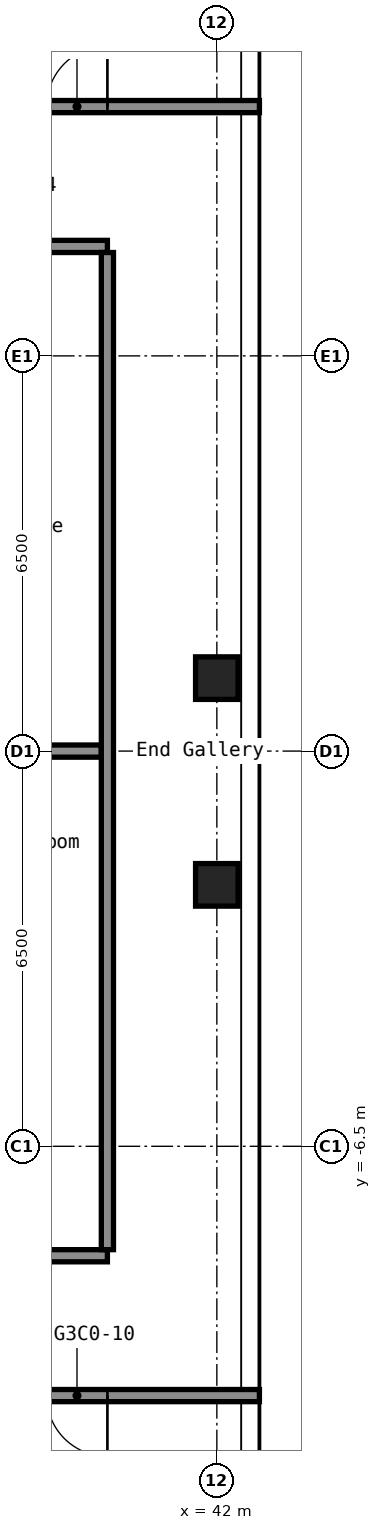
"""IFC4 building model, lengths in metres.
Left out: names, types, materials, properties, quantities, classifications, styles, units other than length and angle.
Written with IfcOpenShell. Run it as: python <this file> out.ifc"""

import sys

from ifc_helpers import new_model, si_unit, direction, frame, frame_2d, origin, origin_2d, place, context, subcontext, project, spatial, rectangle, hollow_rectangle, extrude, element, fill, save


model = new_model("IFC4")
c1 = context("Model", 3, precision=1e-05, world=origin(), true_north=direction((0.0, 1.0)))
c2 = subcontext(c1, "Body", "Model", "MODEL_VIEW")
j1 = project(units=[si_unit("LENGTHUNIT", "METRE"), si_unit("PLANEANGLEUNIT", "RADIAN")], contexts=[c1])
p1 = place(None, origin())
s1 = spatial("IfcSite", under=j1, at=p1, CompositionType="ELEMENT")
p2 = place(p1, origin())
s2 = spatial("IfcBuilding", under=s1, at=p2, CompositionType="ELEMENT")
p3 = place(p2, frame((0.0, 0.0, 137.4)))
s3 = spatial("IfcBuildingStorey", under=s2, at=p3, CompositionType="ELEMENT", Elevation=137.4)
for number, where, z_axis, x_axis in (
    (1, (42.0, -2.2, 0.0), (0.0, 0.0, 1.0), (1.0, 0.0, 0.0)),
    (2, (42.0, 1.2, 0.0), (0.0, 0.0, 1.0), (1.0, 0.0, 0.0)),
):
    element("IfcColumn", number, at=place(p3, frame(where, z_axis=z_axis, x_axis=x_axis)), inside=s3, PredefinedType="COLUMN", context=c2, shape_type="SweptSolid", body=[
        extrude(hollow_rectangle(XDim=0.7, YDim=0.7, WallThickness=0.028, at=origin_2d()), origin(), (0.0, 0.0, 1.0), 2.75),
    ])
p4 = place(p3, frame((16.8, -10.6, 0.0), z_axis=(0.0, 0.0, 1.0), x_axis=(1.0, 0.0, 0.0)))
e3 = element("IfcWall", 3, at=p4, inside=s3, PredefinedType="PARTITIONING", context=c2, shape_type="SweptSolid", body=[
    extrude(rectangle(XDim=25.9, YDim=0.2, at=frame_2d((12.95, 0.0))), origin(), (0.0, 0.0, 1.0), 2.75),
])
p5 = place(p4, frame((5.4, 0.0, 0.0)))
e4 = element("IfcOpeningElement", 4, at=p5, cuts=e3, PredefinedType="OPENING", context=c2, shape_type="SweptSolid", body=[
    extrude(rectangle(XDim=1.0, YDim=2.1, at=frame_2d((0.5, 1.05))), frame((0.0, 0.11, 0.0), z_axis=(0.0, -1.0, 0.0), x_axis=(1.0, 0.0, 0.0)), (0.0, 0.0, 1.0), 0.22),
])
p6 = place(p4, frame((11.25, 0.0, 0.0)))
e5 = element("IfcOpeningElement", 5, at=p6, cuts=e3, PredefinedType="OPENING", context=c2, shape_type="SweptSolid", body=[
    extrude(rectangle(XDim=1.0, YDim=2.1, at=frame_2d((0.5, 1.05))), frame((0.0, 0.11, 0.0), z_axis=(0.0, -1.0, 0.0), x_axis=(1.0, 0.0, 0.0)), (0.0, 0.0, 1.0), 0.22),
])
p7 = place(p4, frame((12.95, 0.0, 0.0)))
e6 = element("IfcOpeningElement", 6, at=p7, cuts=e3, PredefinedType="OPENING", context=c2, shape_type="SweptSolid", body=[
    extrude(rectangle(XDim=1.0, YDim=2.1, at=frame_2d((0.5, 1.05))), frame((0.0, 0.11, 0.0), z_axis=(0.0, -1.0, 0.0), x_axis=(1.0, 0.0, 0.0)), (0.0, 0.0, 1.0), 0.22),
])
p8 = place(p4, frame((22.4, 0.0, 0.0)))
e7 = element("IfcOpeningElement", 7, at=p8, cuts=e3, PredefinedType="OPENING", context=c2, shape_type="SweptSolid", body=[
    extrude(rectangle(XDim=1.0, YDim=2.1, at=frame_2d((0.5, 1.05))), frame((0.0, 0.11, 0.0), z_axis=(0.0, -1.0, 0.0), x_axis=(1.0, 0.0, 0.0)), (0.0, 0.0, 1.0), 0.22),
])
p9 = place(p3, frame((33.6, -8.3, 0.0), z_axis=(0.0, 0.0, 1.0), x_axis=(1.0, 0.0, 0.0)))
e8 = element("IfcWall", 8, at=p9, inside=s3, PredefinedType="PARTITIONING", context=c2, shape_type="SweptSolid", body=[
    extrude(rectangle(XDim=6.6, YDim=0.2, at=frame_2d((3.3, 0.0))), origin(), (0.0, 0.0, 1.0), 2.75),
])
p10 = place(p9, frame((0.805, 0.0, 0.0)))
e9 = element("IfcOpeningElement", 9, at=p10, cuts=e8, PredefinedType="OPENING", context=c2, shape_type="SweptSolid", body=[
    extrude(rectangle(XDim=0.9, YDim=2.1, at=frame_2d((0.45, 1.05))), frame((0.0, 0.11, 0.0), z_axis=(0.0, -1.0, 0.0), x_axis=(1.0, 0.0, 0.0)), (0.0, 0.0, 1.0), 0.22),
])
p11 = place(p9, frame((4.105, 0.0, 0.0)))
e10 = element("IfcOpeningElement", 10, at=p11, cuts=e8, PredefinedType="OPENING", context=c2, shape_type="SweptSolid", body=[
    extrude(rectangle(XDim=0.9, YDim=2.1, at=frame_2d((0.45, 1.05))), frame((0.0, 0.11, 0.0), z_axis=(0.0, -1.0, 0.0), x_axis=(1.0, 0.0, 0.0)), (0.0, 0.0, 1.0), 0.22),
])
p12 = place(p3, frame((33.6, 0.0, 0.0), z_axis=(0.0, 0.0, 1.0), x_axis=(1.0, 0.0, 0.0)))
e11 = element("IfcWall", 11, at=p12, inside=s3, PredefinedType="PARTITIONING", context=c2, shape_type="SweptSolid", body=[
    extrude(rectangle(XDim=6.5, YDim=0.2, at=frame_2d((3.25, 0.0))), origin(), (0.0, 0.0, 1.0), 2.75),
])
p13 = place(p3, frame((33.6, 8.3, 0.0), z_axis=(0.0, 0.0, 1.0), x_axis=(1.0, 0.0, 0.0)))
e12 = element("IfcWall", 12, at=p13, inside=s3, PredefinedType="PARTITIONING", context=c2, shape_type="SweptSolid", body=[
    extrude(rectangle(XDim=6.6, YDim=0.2, at=frame_2d((3.3, 0.0))), origin(), (0.0, 0.0, 1.0), 2.75),
])
p14 = place(p13, frame((1.07, 0.0, 0.0)))
e13 = element("IfcOpeningElement", 13, at=p14, cuts=e12, PredefinedType="OPENING", context=c2, shape_type="SweptSolid", body=[
    extrude(rectangle(XDim=0.9, YDim=2.1, at=frame_2d((0.45, 1.05))), frame((0.0, 0.11, 0.0), z_axis=(0.0, -1.0, 0.0), x_axis=(1.0, 0.0, 0.0)), (0.0, 0.0, 1.0), 0.22),
])
p15 = place(p13, frame((4.37, 0.0, 0.0)))
e14 = element("IfcOpeningElement", 14, at=p15, cuts=e12, PredefinedType="OPENING", context=c2, shape_type="SweptSolid", body=[
    extrude(rectangle(XDim=0.9, YDim=2.1, at=frame_2d((0.45, 1.05))), frame((0.0, 0.11, 0.0), z_axis=(0.0, -1.0, 0.0), x_axis=(1.0, 0.0, 0.0)), (0.0, 0.0, 1.0), 0.22),
])
p16 = place(p3, frame((16.8, 10.6, 0.0), z_axis=(0.0, 0.0, 1.0), x_axis=(1.0, 0.0, 0.0)))
e15 = element("IfcWall", 15, at=p16, inside=s3, PredefinedType="PARTITIONING", context=c2, shape_type="SweptSolid", body=[
    extrude(rectangle(XDim=25.9, YDim=0.2, at=frame_2d((12.95, 0.0))), origin(), (0.0, 0.0, 1.0), 2.75),
])
p17 = place(p16, frame((5.4, 0.0, 0.0)))
e16 = element("IfcOpeningElement", 16, at=p17, cuts=e15, PredefinedType="OPENING", context=c2, shape_type="SweptSolid", body=[
    extrude(rectangle(XDim=1.0, YDim=2.1, at=frame_2d((0.5, 1.05))), frame((0.0, 0.11, 0.0), z_axis=(0.0, -1.0, 0.0), x_axis=(1.0, 0.0, 0.0)), (0.0, 0.0, 1.0), 0.22),
])
p18 = place(p16, frame((11.25, 0.0, 0.0)))
e17 = element("IfcOpeningElement", 17, at=p18, cuts=e15, PredefinedType="OPENING", context=c2, shape_type="SweptSolid", body=[
    extrude(rectangle(XDim=1.0, YDim=2.1, at=frame_2d((0.5, 1.05))), frame((0.0, 0.11, 0.0), z_axis=(0.0, -1.0, 0.0), x_axis=(1.0, 0.0, 0.0)), (0.0, 0.0, 1.0), 0.22),
])
p19 = place(p16, frame((12.95, 0.0, 0.0)))
e18 = element("IfcOpeningElement", 18, at=p19, cuts=e15, PredefinedType="OPENING", context=c2, shape_type="SweptSolid", body=[
    extrude(rectangle(XDim=1.0, YDim=2.1, at=frame_2d((0.5, 1.05))), frame((0.0, 0.11, 0.0), z_axis=(0.0, -1.0, 0.0), x_axis=(1.0, 0.0, 0.0)), (0.0, 0.0, 1.0), 0.22),
])
p20 = place(p16, frame((22.4, 0.0, 0.0)))
e19 = element("IfcOpeningElement", 19, at=p20, cuts=e15, PredefinedType="OPENING", context=c2, shape_type="SweptSolid", body=[
    extrude(rectangle(XDim=1.0, YDim=2.1, at=frame_2d((0.5, 1.05))), frame((0.0, 0.11, 0.0), z_axis=(0.0, -1.0, 0.0), x_axis=(1.0, 0.0, 0.0)), (0.0, 0.0, 1.0), 0.22),
])
p21 = place(p3, frame((40.2, -8.2, 0.0), z_axis=(0.0, 0.0, 1.0), x_axis=(0.0, 1.0, 0.0)))
e20 = element("IfcWall", 20, at=p21, inside=s3, PredefinedType="PARTITIONING", context=c2, shape_type="SweptSolid", body=[
    extrude(rectangle(XDim=16.4, YDim=0.2, at=frame_2d((8.2, 0.0))), origin(), (0.0, 0.0, 1.0), 2.75),
])
p22 = place(p8, origin())
e21 = element("IfcDoor", 21, at=p22, inside=s3, OperationType="SINGLE_SWING_RIGHT", PredefinedType="DOOR", context=c2, shape_type="SweptSolid", body=[
    extrude(rectangle(XDim=1.0, YDim=2.1, at=frame_2d((0.5, 1.05))), frame((0.0, 0.025, 0.0), z_axis=(0.0, -1.0, 0.0), x_axis=(1.0, 0.0, 0.0)), (0.0, 0.0, 1.0), 0.05),
])
fill(e7, e21)
p23 = place(p20, origin())
e22 = element("IfcDoor", 22, at=p23, inside=s3, OperationType="SINGLE_SWING_LEFT", PredefinedType="DOOR", context=c2, shape_type="SweptSolid", body=[
    extrude(rectangle(XDim=1.0, YDim=2.1, at=frame_2d((0.5, 1.05))), frame((0.0, 0.025, 0.0), z_axis=(0.0, -1.0, 0.0), x_axis=(1.0, 0.0, 0.0)), (0.0, 0.0, 1.0), 0.05),
])
fill(e19, e22)
save(model, sys.argv[1])
